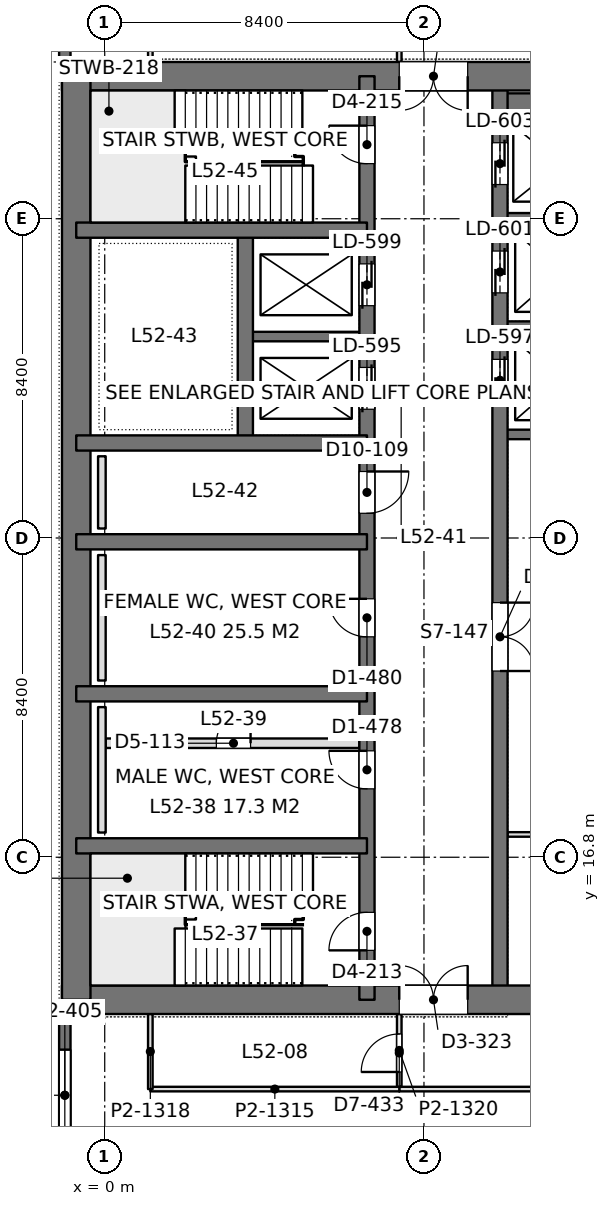
"""IFC4 building model, lengths in metres.
Left out: names, types, materials, properties, quantities, classifications, styles, units other than length and angle.
Written with IfcOpenShell. Run it as: python <this file> out.ifc"""

import sys

from ifc_helpers import new_model, si_unit, direction, frame, frame_2d, origin, place, context, subcontext, project, spatial, rectangle, extrude, element, fill, save


model = new_model("IFC4")
c1 = context("Model", 3, precision=1e-05, world=origin(), true_north=direction((0.0, 1.0)))
c2 = subcontext(c1, "Body", "Model", "MODEL_VIEW")
j1 = project(units=[si_unit("LENGTHUNIT", "METRE"), si_unit("PLANEANGLEUNIT", "RADIAN")], contexts=[c1])
p1 = place(None, origin())
s1 = spatial("IfcSite", under=j1, at=p1, CompositionType="ELEMENT")
p2 = place(p1, origin())
s2 = spatial("IfcBuilding", under=s1, at=p2, CompositionType="ELEMENT")
p3 = place(p2, frame((0.0, 0.0, 228.0)))
s3 = spatial("IfcBuildingStorey", under=s2, at=p3, CompositionType="ELEMENT", Elevation=228.0)
p4 = place(p3, frame((-1.125, 13.05, 0.0), z_axis=(0.0, 0.0, 1.0), x_axis=(1.0, 0.0, 0.0)))
e1 = element("IfcWall", 1, at=p4, inside=s3, PredefinedType="SHEAR", context=c2, shape_type="SweptSolid", body=[
    extrude(rectangle(XDim=17.85, YDim=0.75, at=frame_2d((8.925, 0.0))), origin(), (0.0, 0.0, 1.0), 4.2),
])
p5 = place(p4, frame((8.875, 0.0, 0.0)))
e2 = element("IfcOpeningElement", 2, at=p5, cuts=e1, PredefinedType="OPENING", context=c2, shape_type="SweptSolid", body=[
    extrude(rectangle(XDim=1.8, YDim=2.4, at=frame_2d((0.9, 1.2))), frame((0.0, 0.385, 0.0), z_axis=(0.0, -1.0, 0.0), x_axis=(1.0, 0.0, 0.0)), (0.0, 0.0, 1.0), 0.77),
])
p6 = place(p3, frame((-1.125, 37.35, 0.0), z_axis=(0.0, 0.0, 1.0), x_axis=(1.0, 0.0, 0.0)))
e3 = element("IfcWall", 3, at=p6, inside=s3, PredefinedType="SHEAR", context=c2, shape_type="SweptSolid", body=[
    extrude(rectangle(XDim=17.85, YDim=0.75, at=frame_2d((8.925, 0.0))), origin(), (0.0, 0.0, 1.0), 4.2),
])
p7 = place(p6, frame((8.875, 0.0, 0.0)))
e4 = element("IfcOpeningElement", 4, at=p7, cuts=e3, PredefinedType="OPENING", context=c2, shape_type="SweptSolid", body=[
    extrude(rectangle(XDim=1.8, YDim=2.4, at=frame_2d((0.9, 1.2))), frame((0.0, 0.385, 0.0), z_axis=(0.0, -1.0, 0.0), x_axis=(1.0, 0.0, 0.0)), (0.0, 0.0, 1.0), 0.77),
])
p8 = place(p3, frame((-0.75, 13.05, 0.0), z_axis=(0.0, 0.0, 1.0), x_axis=(0.0, 1.0, 0.0)))
e5 = element("IfcWall", 5, at=p8, inside=s3, PredefinedType="SHEAR", context=c2, shape_type="SweptSolid", body=[
    extrude(rectangle(XDim=24.3, YDim=0.75, at=frame_2d((12.15, 0.0))), origin(), (0.0, 0.0, 1.0), 4.2),
])
p9 = place(p3, frame((6.9, 13.05, 0.0), z_axis=(0.0, 0.0, 1.0), x_axis=(0.0, 1.0, 0.0)))
e6 = element("IfcWall", 6, at=p9, inside=s3, PredefinedType="SHEAR", context=c2, shape_type="SweptSolid", body=[
    extrude(rectangle(XDim=24.3, YDim=0.4, at=frame_2d((12.15, 0.0))), origin(), (0.0, 0.0, 1.0), 4.2),
])
p10 = place(p9, frame((1.3, 0.0, 0.0)))
e7 = element("IfcOpeningElement", 7, at=p10, cuts=e6, PredefinedType="OPENING", context=c2, shape_type="SweptSolid", body=[
    extrude(rectangle(XDim=1.0, YDim=2.2, at=frame_2d((0.5, 1.1))), frame((0.0, 0.21, 0.0), z_axis=(0.0, -1.0, 0.0), x_axis=(1.0, 0.0, 0.0)), (0.0, 0.0, 1.0), 0.42),
])
p11 = place(p9, frame((22.0, 0.0, 0.0)))
e8 = element("IfcOpeningElement", 8, at=p11, cuts=e6, PredefinedType="OPENING", context=c2, shape_type="SweptSolid", body=[
    extrude(rectangle(XDim=1.0, YDim=2.2, at=frame_2d((0.5, 1.1))), frame((0.0, 0.21, 0.0), z_axis=(0.0, -1.0, 0.0), x_axis=(1.0, 0.0, 0.0)), (0.0, 0.0, 1.0), 0.42),
])
p12 = place(p9, frame((5.55, 0.0, 0.0)))
e9 = element("IfcOpeningElement", 9, at=p12, cuts=e6, PredefinedType="OPENING", context=c2, shape_type="SweptSolid", body=[
    extrude(rectangle(XDim=1.0, YDim=2.2, at=frame_2d((0.5, 1.1))), frame((0.0, 0.21, 0.0), z_axis=(0.0, -1.0, 0.0), x_axis=(1.0, 0.0, 0.0)), (0.0, 0.0, 1.0), 0.42),
])
p13 = place(p9, frame((9.55, 0.0, 0.0)))
e10 = element("IfcOpeningElement", 10, at=p13, cuts=e6, PredefinedType="OPENING", context=c2, shape_type="SweptSolid", body=[
    extrude(rectangle(XDim=1.0, YDim=2.2, at=frame_2d((0.5, 1.1))), frame((0.0, 0.21, 0.0), z_axis=(0.0, -1.0, 0.0), x_axis=(1.0, 0.0, 0.0)), (0.0, 0.0, 1.0), 0.42),
])
p14 = place(p9, frame((12.8, 0.0, 0.0)))
e11 = element("IfcOpeningElement", 11, at=p14, cuts=e6, PredefinedType="OPENING", context=c2, shape_type="SweptSolid", body=[
    extrude(rectangle(XDim=1.1, YDim=2.2, at=frame_2d((0.55, 1.1))), frame((0.0, 0.21, 0.0), z_axis=(0.0, -1.0, 0.0), x_axis=(1.0, 0.0, 0.0)), (0.0, 0.0, 1.0), 0.42),
])
p15 = place(p9, frame((15.538, 0.0, 0.0)))
e12 = element("IfcOpeningElement", 12, at=p15, cuts=e6, PredefinedType="OPENING", context=c2, shape_type="SweptSolid", body=[
    extrude(rectangle(XDim=1.1, YDim=2.2, at=frame_2d((0.55, 1.1))), frame((0.0, 0.21, 0.0), z_axis=(0.0, -1.0, 0.0), x_axis=(1.0, 0.0, 0.0)), (0.0, 0.0, 1.0), 0.42),
])
p16 = place(p9, frame((18.262, 0.0, 0.0)))
e13 = element("IfcOpeningElement", 13, at=p16, cuts=e6, PredefinedType="OPENING", context=c2, shape_type="SweptSolid", body=[
    extrude(rectangle(XDim=1.1, YDim=2.2, at=frame_2d((0.55, 1.1))), frame((0.0, 0.21, 0.0), z_axis=(0.0, -1.0, 0.0), x_axis=(1.0, 0.0, 0.0)), (0.0, 0.0, 1.0), 0.42),
])
p17 = place(p3, frame((10.4, 13.05, 0.0), z_axis=(0.0, 0.0, 1.0), x_axis=(0.0, 1.0, 0.0)))
e14 = element("IfcWall", 14, at=p17, inside=s3, PredefinedType="SHEAR", context=c2, shape_type="SweptSolid", body=[
    extrude(rectangle(XDim=24.3, YDim=0.4, at=frame_2d((12.15, 0.0))), origin(), (0.0, 0.0, 1.0), 4.2),
])
p18 = place(p17, frame((15.75, 0.0, 0.0)))
e15 = element("IfcOpeningElement", 15, at=p18, cuts=e14, PredefinedType="OPENING", context=c2, shape_type="SweptSolid", body=[
    extrude(rectangle(XDim=1.1, YDim=2.2, at=frame_2d((0.55, 1.1))), frame((0.0, 0.21, 0.0), z_axis=(0.0, -1.0, 0.0), x_axis=(1.0, 0.0, 0.0)), (0.0, 0.0, 1.0), 0.42),
])
p19 = place(p17, frame((18.6, 0.0, 0.0)))
e16 = element("IfcOpeningElement", 16, at=p19, cuts=e14, PredefinedType="OPENING", context=c2, shape_type="SweptSolid", body=[
    extrude(rectangle(XDim=1.1, YDim=2.2, at=frame_2d((0.55, 1.1))), frame((0.0, 0.21, 0.0), z_axis=(0.0, -1.0, 0.0), x_axis=(1.0, 0.0, 0.0)), (0.0, 0.0, 1.0), 0.42),
])
p20 = place(p17, frame((21.45, 0.0, 0.0)))
e17 = element("IfcOpeningElement", 17, at=p20, cuts=e14, PredefinedType="OPENING", context=c2, shape_type="SweptSolid", body=[
    extrude(rectangle(XDim=1.1, YDim=2.2, at=frame_2d((0.55, 1.1))), frame((0.0, 0.21, 0.0), z_axis=(0.0, -1.0, 0.0), x_axis=(1.0, 0.0, 0.0)), (0.0, 0.0, 1.0), 0.42),
])
p21 = place(p17, frame((8.65, 0.0, 0.0)))
e18 = element("IfcOpeningElement", 18, at=p21, cuts=e14, PredefinedType="OPENING", context=c2, shape_type="SweptSolid", body=[
    extrude(rectangle(XDim=1.8, YDim=2.4, at=frame_2d((0.9, 1.2))), frame((0.0, 0.21, 0.0), z_axis=(0.0, -1.0, 0.0), x_axis=(1.0, 0.0, 0.0)), (0.0, 0.0, 1.0), 0.42),
])
for number, where, z_axis, x_axis in (
    (19, (-0.75, 17.1, 0.0), (0.0, 0.0, 1.0), (1.0, 0.0, 0.0)),
    (20, (-0.75, 21.1, 0.0), (0.0, 0.0, 1.0), (1.0, 0.0, 0.0)),
    (21, (-0.75, 25.1, 0.0), (0.0, 0.0, 1.0), (1.0, 0.0, 0.0)),
    (22, (-0.75, 27.7, 0.0), (0.0, 0.0, 1.0), (1.0, 0.0, 0.0)),
    (23, (-0.75, 33.3, 0.0), (0.0, 0.0, 1.0), (1.0, 0.0, 0.0)),
):
    element("IfcWall", number, at=place(p3, frame(where, z_axis=z_axis, x_axis=x_axis)), inside=s3, PredefinedType="SHEAR", context=c2, shape_type="SweptSolid", body=[
        extrude(rectangle(XDim=7.65, YDim=0.4, at=frame_2d((3.825, 0.0))), origin(), (0.0, 0.0, 1.0), 4.2),
    ])
p22 = place(p3, frame((3.7, 27.7, 0.0), z_axis=(0.0, 0.0, 1.0), x_axis=(0.0, 1.0, 0.0)))
e24 = element("IfcWall", 24, at=p22, inside=s3, PredefinedType="SHEAR", context=c2, shape_type="SweptSolid", body=[
    extrude(rectangle(XDim=5.6, YDim=0.4, at=frame_2d((2.8, 0.0))), origin(), (0.0, 0.0, 1.0), 4.2),
])
p23 = place(p3, frame((3.7, 30.5, 0.0), z_axis=(0.0, 0.0, 1.0), x_axis=(1.0, 0.0, 0.0)))
e25 = element("IfcWall", 25, at=p23, inside=s3, PredefinedType="SHEAR", context=c2, shape_type="SweptSolid", body=[
    extrude(rectangle(XDim=3.2, YDim=0.25, at=frame_2d((1.6, 0.0))), origin(), (0.0, 0.0, 1.0), 4.2),
])
p24 = place(p3, frame((10.4, 27.925, 0.0), z_axis=(0.0, 0.0, 1.0), x_axis=(1.0, 0.0, 0.0)))
e26 = element("IfcWall", 26, at=p24, inside=s3, PredefinedType="SHEAR", context=c2, shape_type="SweptSolid", body=[
    extrude(rectangle(XDim=5.95, YDim=0.25, at=frame_2d((2.975, 0.0))), origin(), (0.0, 0.0, 1.0), 4.2),
])
for number, where, z_axis, x_axis in (
    (27, (10.4, 30.775, 0.0), (0.0, 0.0, 1.0), (1.0, 0.0, 0.0)),
    (28, (10.4, 33.625, 0.0), (0.0, 0.0, 1.0), (1.0, 0.0, 0.0)),
):
    element("IfcWall", number, at=place(p3, frame(where, z_axis=z_axis, x_axis=x_axis)), inside=s3, PredefinedType="SHEAR", context=c2, shape_type="SweptSolid", body=[
        extrude(rectangle(XDim=3.2, YDim=0.25, at=frame_2d((1.6, 0.0))), origin(), (0.0, 0.0, 1.0), 4.2),
    ])
p25 = place(p3, frame((10.4, 36.625, 0.0), z_axis=(0.0, 0.0, 1.0), x_axis=(1.0, 0.0, 0.0)))
e29 = element("IfcWall", 29, at=p25, inside=s3, PredefinedType="SHEAR", context=c2, shape_type="SweptSolid", body=[
    extrude(rectangle(XDim=3.2, YDim=0.55, at=frame_2d((1.6, 0.0))), origin(), (0.0, 0.0, 1.0), 4.2),
])
p26 = place(p3, frame((-1.05, 8.4, 0.0), z_axis=(0.0, 0.0, 1.0), x_axis=(0.0, 1.0, 0.0)))
e30 = element("IfcWall", 30, at=p26, inside=s3, PredefinedType="SOLIDWALL", context=c2, shape_type="SweptSolid", body=[
    extrude(rectangle(XDim=4.275, YDim=0.3, at=frame_2d((2.138, 0.0))), origin(), (0.0, 0.0, 1.0), 4.05),
])
p27 = place(p26, frame((0.938, 0.0, 0.9)))
e31 = element("IfcOpeningElement", 31, at=p27, cuts=e30, PredefinedType="OPENING", context=c2, shape_type="SweptSolid", body=[
    extrude(rectangle(XDim=2.4, YDim=1.9, at=frame_2d((1.2, 0.95))), frame((0.0, 0.16, 0.0), z_axis=(0.0, -1.0, 0.0), x_axis=(1.0, 0.0, 0.0)), (0.0, 0.0, 1.0), 0.32),
])
p28 = place(p3, frame((-1.05, 37.725, 0.0), z_axis=(0.0, 0.0, 1.0), x_axis=(0.0, 1.0, 0.0)))
e32 = element("IfcWall", 32, at=p28, inside=s3, PredefinedType="SOLIDWALL", context=c2, shape_type="SweptSolid", body=[
    extrude(rectangle(XDim=4.275, YDim=0.3, at=frame_2d((2.137, 0.0))), origin(), (0.0, 0.0, 1.0), 4.05),
])
p29 = place(p28, frame((0.938, 0.0, 0.9)))
e33 = element("IfcOpeningElement", 33, at=p29, cuts=e32, PredefinedType="OPENING", context=c2, shape_type="SweptSolid", body=[
    extrude(rectangle(XDim=2.4, YDim=1.9, at=frame_2d((1.2, 0.95))), frame((0.0, 0.16, 0.0), z_axis=(0.0, -1.0, 0.0), x_axis=(1.0, 0.0, 0.0)), (0.0, 0.0, 1.0), 0.32),
])
p30 = place(p3, frame((10.598, 17.4, 0.0), z_axis=(0.0, 0.0, 1.0), x_axis=(1.0, 0.0, 0.0)))
e34 = element("IfcWall", 34, at=p30, inside=s3, PredefinedType="PARTITIONING", context=c2, shape_type="SweptSolid", body=[
    extrude(rectangle(XDim=5.904, YDim=0.12, at=frame_2d((2.952, 0.0))), origin(), (0.0, 0.0, 1.0), 3.55),
])
p31 = place(p3, frame((7.748, 10.7, 0.0), z_axis=(0.0, 0.0, 1.0), x_axis=(1.0, 0.0, 0.0)))
e35 = element("IfcWall", 35, at=p31, inside=s3, PredefinedType="PARTITIONING", context=c2, shape_type="SweptSolid", body=[
    extrude(rectangle(XDim=34.904, YDim=0.12, at=frame_2d((17.452, 0.0))), origin(), (0.0, 0.0, 1.0), 3.55),
])
p32 = place(p31, frame((10.735, 0.0, 0.0)))
e36 = element("IfcOpeningElement", 36, at=p32, cuts=e35, PredefinedType="OPENING", context=c2, shape_type="SweptSolid", body=[
    extrude(rectangle(XDim=1.8, YDim=2.2, at=frame_2d((0.9, 1.1))), frame((0.0, 0.07, 0.0), z_axis=(0.0, -1.0, 0.0), x_axis=(1.0, 0.0, 0.0)), (0.0, 0.0, 1.0), 0.14),
])
p33 = place(p31, frame((22.369, 0.0, 0.0)))
e37 = element("IfcOpeningElement", 37, at=p33, cuts=e35, PredefinedType="OPENING", context=c2, shape_type="SweptSolid", body=[
    extrude(rectangle(XDim=1.8, YDim=2.2, at=frame_2d((0.9, 1.1))), frame((0.0, 0.07, 0.0), z_axis=(0.0, -1.0, 0.0), x_axis=(1.0, 0.0, 0.0)), (0.0, 0.0, 1.0), 0.14),
])
p34 = place(p3, frame((7.75, 10.758, 0.0), z_axis=(0.0, 0.0, 1.0), x_axis=(0.0, 1.0, 0.0)))
e38 = element("IfcWall", 38, at=p34, inside=s3, PredefinedType="PARTITIONING", context=c2, shape_type="SweptSolid", body=[
    extrude(rectangle(XDim=1.918, YDim=0.12, at=frame_2d((0.959, 0.0))), origin(), (0.0, 0.0, 1.0), 4.05),
])
p35 = place(p34, frame((0.392, 0.0, 0.0)))
e39 = element("IfcOpeningElement", 39, at=p35, cuts=e38, PredefinedType="OPENING", context=c2, shape_type="SweptSolid", body=[
    extrude(rectangle(XDim=1.0, YDim=2.4, at=frame_2d((0.5, 1.2))), frame((0.0, 0.07, 0.0), z_axis=(0.0, -1.0, 0.0), x_axis=(1.0, 0.0, 0.0)), (0.0, 0.0, 1.0), 0.14),
])
p36 = place(p3, frame((1.2, 10.7, 0.0), z_axis=(0.0, 0.0, 1.0), x_axis=(1.0, 0.0, 0.0)))
e40 = element("IfcWall", 40, at=p36, inside=s3, PredefinedType="PARTITIONING", context=c2, shape_type="SweptSolid", body=[
    extrude(rectangle(XDim=6.552, YDim=0.12, at=frame_2d((3.276, 0.0))), origin(), (0.0, 0.0, 1.0), 4.05),
])
p37 = place(p3, frame((1.2, 10.7, 0.0), z_axis=(0.0, 0.0, 1.0), x_axis=(0.0, 1.0, 0.0)))
e41 = element("IfcWall", 41, at=p37, inside=s3, PredefinedType="PARTITIONING", context=c2, shape_type="SweptSolid", body=[
    extrude(rectangle(XDim=1.976, YDim=0.12, at=frame_2d((0.988, 0.0))), origin(), (0.0, 0.0, 1.0), 4.05),
])
p38 = place(p3, frame((7.75, 37.724, 0.0), z_axis=(0.0, 0.0, 1.0), x_axis=(0.0, 1.0, 0.0)))
e42 = element("IfcWall", 42, at=p38, inside=s3, PredefinedType="PARTITIONING", context=c2, shape_type="SweptSolid", body=[
    extrude(rectangle(XDim=1.918, YDim=0.12, at=frame_2d((0.959, 0.0))), origin(), (0.0, 0.0, 1.0), 4.05),
])
p39 = place(p38, frame((0.526, 0.0, 0.0)))
e43 = element("IfcOpeningElement", 43, at=p39, cuts=e42, PredefinedType="OPENING", context=c2, shape_type="SweptSolid", body=[
    extrude(rectangle(XDim=1.0, YDim=2.4, at=frame_2d((0.5, 1.2))), frame((0.0, 0.07, 0.0), z_axis=(0.0, -1.0, 0.0), x_axis=(1.0, 0.0, 0.0)), (0.0, 0.0, 1.0), 0.14),
])
p40 = place(p3, frame((1.2, 37.724, 0.0), z_axis=(0.0, 0.0, 1.0), x_axis=(0.0, 1.0, 0.0)))
e44 = element("IfcWall", 44, at=p40, inside=s3, PredefinedType="PARTITIONING", context=c2, shape_type="SweptSolid", body=[
    extrude(rectangle(XDim=1.976, YDim=0.12, at=frame_2d((0.988, 0.0))), origin(), (0.0, 0.0, 1.0), 4.05),
])
p41 = place(p3, frame((0.025, 19.8, 0.0), z_axis=(0.0, 0.0, 1.0), x_axis=(1.0, 0.0, 0.0)))
e45 = element("IfcWall", 45, at=p41, inside=s3, PredefinedType="PARTITIONING", context=c2, shape_type="SweptSolid", body=[
    extrude(rectangle(XDim=6.675, YDim=0.25, at=frame_2d((3.337, 0.0))), origin(), (0.0, 0.0, 1.0), 4.0),
])
p42 = place(p41, frame((2.913, 0.0, 0.0)))
e46 = element("IfcOpeningElement", 46, at=p42, cuts=e45, PredefinedType="OPENING", context=c2, shape_type="SweptSolid", body=[
    extrude(rectangle(XDim=0.9, YDim=2.2, at=frame_2d((0.45, 1.1))), frame((0.0, 0.135, 0.0), z_axis=(0.0, -1.0, 0.0), x_axis=(1.0, 0.0, 0.0)), (0.0, 0.0, 1.0), 0.27),
])
for number, where, z_axis, x_axis in (
    (47, (-0.075, 17.45, 0.0), (0.0, 0.0, 1.0), (0.0, 1.0, 0.0)),
    (48, (-0.075, 21.45, 0.0), (0.0, 0.0, 1.0), (0.0, 1.0, 0.0)),
):
    element("IfcWall", number, at=place(p3, frame(where, z_axis=z_axis, x_axis=x_axis)), inside=s3, PredefinedType="PLUMBINGWALL", context=c2, shape_type="SweptSolid", body=[
        extrude(rectangle(XDim=3.3, YDim=0.2, at=frame_2d((1.65, 0.0))), origin(), (0.0, 0.0, 1.0), 1.2),
    ])
p43 = place(p3, frame((-0.075, 25.45, 0.0), z_axis=(0.0, 0.0, 1.0), x_axis=(0.0, 1.0, 0.0)))
e49 = element("IfcWall", 49, at=p43, inside=s3, PredefinedType="PLUMBINGWALL", context=c2, shape_type="SweptSolid", body=[
    extrude(rectangle(XDim=1.9, YDim=0.2, at=frame_2d((0.95, 0.0))), origin(), (0.0, 0.0, 1.0), 1.2),
])
p44 = place(p27, origin())
e50 = element("IfcWindow", 50, at=p44, inside=s3, PartitioningType="SINGLE_PANEL", PredefinedType="WINDOW", context=c2, shape_type="SweptSolid", body=[
    extrude(rectangle(XDim=2.4, YDim=1.9, at=frame_2d((1.2, 0.95))), frame((0.0, 0.03, 0.0), z_axis=(0.0, -1.0, 0.0), x_axis=(1.0, 0.0, 0.0)), (0.0, 0.0, 1.0), 0.06),
])
fill(e31, e50)
p45 = place(p5, origin())
e51 = element("IfcDoor", 51, at=p45, inside=s3, OperationType="DOUBLE_DOOR_SINGLE_SWING", PredefinedType="DOOR", context=c2, shape_type="SweptSolid", body=[
    extrude(rectangle(XDim=1.8, YDim=2.4, at=frame_2d((0.9, 1.2))), frame((0.0, 0.025, 0.0), z_axis=(0.0, -1.0, 0.0), x_axis=(1.0, 0.0, 0.0)), (0.0, 0.0, 1.0), 0.05),
])
fill(e2, e51)
p46 = place(p7, frame((1.8, 0.0, 0.0), z_axis=(0.0, 0.0, 1.0), x_axis=(-1.0, 0.0, 0.0)))
e52 = element("IfcDoor", 52, at=p46, inside=s3, OperationType="DOUBLE_DOOR_SINGLE_SWING", PredefinedType="DOOR", context=c2, shape_type="SweptSolid", body=[
    extrude(rectangle(XDim=1.8, YDim=2.4, at=frame_2d((0.9, 1.2))), frame((0.0, 0.025, 0.0), z_axis=(0.0, -1.0, 0.0), x_axis=(1.0, 0.0, 0.0)), (0.0, 0.0, 1.0), 0.05),
])
fill(e4, e52)
p47 = place(p10, origin())
e53 = element("IfcDoor", 53, at=p47, inside=s3, OperationType="SINGLE_SWING_LEFT", PredefinedType="DOOR", context=c2, shape_type="SweptSolid", body=[
    extrude(rectangle(XDim=1.0, YDim=2.2, at=frame_2d((0.5, 1.1))), frame((0.0, 0.025, 0.0), z_axis=(0.0, -1.0, 0.0), x_axis=(1.0, 0.0, 0.0)), (0.0, 0.0, 1.0), 0.05),
])
fill(e7, e53)
p48 = place(p11, origin())
e54 = element("IfcDoor", 54, at=p48, inside=s3, OperationType="SINGLE_SWING_RIGHT", PredefinedType="DOOR", context=c2, shape_type="SweptSolid", body=[
    extrude(rectangle(XDim=1.0, YDim=2.2, at=frame_2d((0.5, 1.1))), frame((0.0, 0.025, 0.0), z_axis=(0.0, -1.0, 0.0), x_axis=(1.0, 0.0, 0.0)), (0.0, 0.0, 1.0), 0.05),
])
fill(e8, e54)
p49 = place(p12, origin())
e55 = element("IfcDoor", 55, at=p49, inside=s3, OperationType="SINGLE_SWING_RIGHT", PredefinedType="DOOR", context=c2, shape_type="SweptSolid", body=[
    extrude(rectangle(XDim=1.0, YDim=2.2, at=frame_2d((0.5, 1.1))), frame((0.0, 0.025, 0.0), z_axis=(0.0, -1.0, 0.0), x_axis=(1.0, 0.0, 0.0)), (0.0, 0.0, 1.0), 0.05),
])
fill(e9, e55)
p50 = place(p13, origin())
e56 = element("IfcDoor", 56, at=p50, inside=s3, OperationType="SINGLE_SWING_RIGHT", PredefinedType="DOOR", context=c2, shape_type="SweptSolid", body=[
    extrude(rectangle(XDim=1.0, YDim=2.2, at=frame_2d((0.5, 1.1))), frame((0.0, 0.025, 0.0), z_axis=(0.0, -1.0, 0.0), x_axis=(1.0, 0.0, 0.0)), (0.0, 0.0, 1.0), 0.05),
])
fill(e10, e56)
p51 = place(p14, frame((1.1, 0.0, 0.0), z_axis=(0.0, 0.0, 1.0), x_axis=(-1.0, 0.0, 0.0)))
e57 = element("IfcDoor", 57, at=p51, inside=s3, OperationType="SINGLE_SWING_LEFT", PredefinedType="DOOR", context=c2, shape_type="SweptSolid", body=[
    extrude(rectangle(XDim=1.1, YDim=2.2, at=frame_2d((0.55, 1.1))), frame((0.0, 0.025, 0.0), z_axis=(0.0, -1.0, 0.0), x_axis=(1.0, 0.0, 0.0)), (0.0, 0.0, 1.0), 0.05),
])
fill(e11, e57)
p52 = place(p18, origin())
e58 = element("IfcDoor", 58, at=p52, inside=s3, OperationType="DOUBLE_DOOR_SLIDING", PredefinedType="DOOR", context=c2, shape_type="SweptSolid", body=[
    extrude(rectangle(XDim=1.1, YDim=2.2, at=frame_2d((0.55, 1.1))), frame((0.0, 0.025, 0.0), z_axis=(0.0, -1.0, 0.0), x_axis=(1.0, 0.0, 0.0)), (0.0, 0.0, 1.0), 0.05),
])
fill(e15, e58)
p53 = place(p19, origin())
e59 = element("IfcDoor", 59, at=p53, inside=s3, OperationType="DOUBLE_DOOR_SLIDING", PredefinedType="DOOR", context=c2, shape_type="SweptSolid", body=[
    extrude(rectangle(XDim=1.1, YDim=2.2, at=frame_2d((0.55, 1.1))), frame((0.0, 0.025, 0.0), z_axis=(0.0, -1.0, 0.0), x_axis=(1.0, 0.0, 0.0)), (0.0, 0.0, 1.0), 0.05),
])
fill(e16, e59)
p54 = place(p20, origin())
e60 = element("IfcDoor", 60, at=p54, inside=s3, OperationType="DOUBLE_DOOR_SLIDING", PredefinedType="DOOR", context=c2, shape_type="SweptSolid", body=[
    extrude(rectangle(XDim=1.1, YDim=2.2, at=frame_2d((0.55, 1.1))), frame((0.0, 0.025, 0.0), z_axis=(0.0, -1.0, 0.0), x_axis=(1.0, 0.0, 0.0)), (0.0, 0.0, 1.0), 0.05),
])
fill(e17, e60)
p55 = place(p15, origin())
e61 = element("IfcDoor", 61, at=p55, inside=s3, OperationType="DOUBLE_DOOR_SLIDING", PredefinedType="DOOR", context=c2, shape_type="SweptSolid", body=[
    extrude(rectangle(XDim=1.1, YDim=2.2, at=frame_2d((0.55, 1.1))), frame((0.0, 0.025, 0.0), z_axis=(0.0, -1.0, 0.0), x_axis=(1.0, 0.0, 0.0)), (0.0, 0.0, 1.0), 0.05),
])
fill(e12, e61)
p56 = place(p16, origin())
e62 = element("IfcDoor", 62, at=p56, inside=s3, OperationType="DOUBLE_DOOR_SLIDING", PredefinedType="DOOR", context=c2, shape_type="SweptSolid", body=[
    extrude(rectangle(XDim=1.1, YDim=2.2, at=frame_2d((0.55, 1.1))), frame((0.0, 0.025, 0.0), z_axis=(0.0, -1.0, 0.0), x_axis=(1.0, 0.0, 0.0)), (0.0, 0.0, 1.0), 0.05),
])
fill(e13, e62)
p57 = place(p21, frame((1.8, 0.0, 0.0), z_axis=(0.0, 0.0, 1.0), x_axis=(-1.0, 0.0, 0.0)))
e63 = element("IfcDoor", 63, at=p57, inside=s3, OperationType="DOUBLE_DOOR_SINGLE_SWING", PredefinedType="DOOR", context=c2, shape_type="SweptSolid", body=[
    extrude(rectangle(XDim=1.8, YDim=2.4, at=frame_2d((0.9, 1.2))), frame((0.0, 0.025, 0.0), z_axis=(0.0, -1.0, 0.0), x_axis=(1.0, 0.0, 0.0)), (0.0, 0.0, 1.0), 0.05),
])
fill(e18, e63)
p58 = place(p35, origin())
e64 = element("IfcDoor", 64, at=p58, inside=s3, OperationType="SINGLE_SWING_LEFT", PredefinedType="DOOR", context=c2, shape_type="SweptSolid", body=[
    extrude(rectangle(XDim=1.0, YDim=2.4, at=frame_2d((0.5, 1.2))), frame((0.0, 0.025, 0.0), z_axis=(0.0, -1.0, 0.0), x_axis=(1.0, 0.0, 0.0)), (0.0, 0.0, 1.0), 0.05),
])
fill(e39, e64)
p59 = place(p42, origin())
e65 = element("IfcDoor", 65, at=p59, inside=s3, OperationType="SINGLE_SWING_RIGHT", PredefinedType="DOOR", context=c2, shape_type="SweptSolid", body=[
    extrude(rectangle(XDim=0.9, YDim=2.2, at=frame_2d((0.45, 1.1))), frame((0.0, 0.025, 0.0), z_axis=(0.0, -1.0, 0.0), x_axis=(1.0, 0.0, 0.0)), (0.0, 0.0, 1.0), 0.05),
])
fill(e46, e65)
save(model, sys.argv[1])
